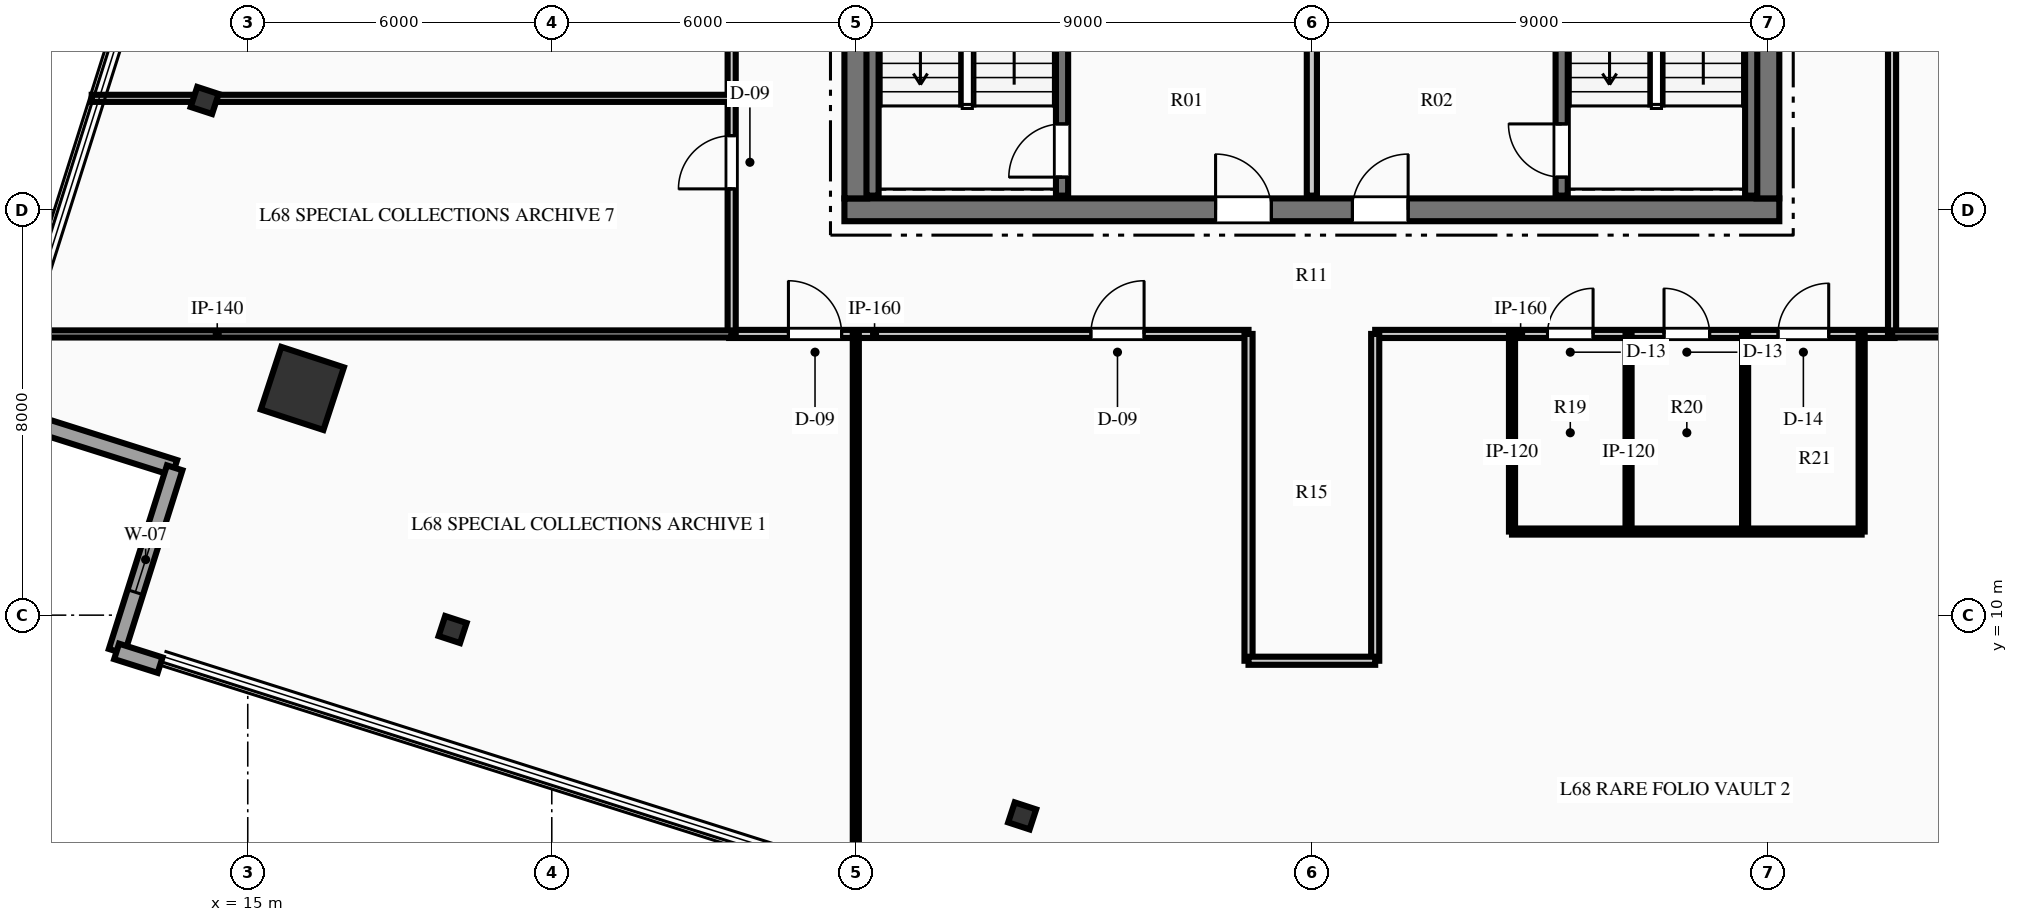
"""IFC4 building model, lengths in metres.
Left out: names, types, materials, properties, quantities, classifications, styles, units other than length and angle.
Written with IfcOpenShell. Run it as: python <this file> out.ifc"""

import sys

from ifc_helpers import new_model, si_unit, direction, frame, frame_2d, origin, origin_2d, place, context, subcontext, project, spatial, rectangle, hollow_rectangle, i_section, extrude, element, fill, save


model = new_model("IFC4")
c1 = context("Model", 3, precision=1e-05, world=origin(), true_north=direction((0.0, 1.0)))
c2 = subcontext(c1, "Body", "Model", "MODEL_VIEW")
j1 = project(units=[si_unit("LENGTHUNIT", "METRE"), si_unit("PLANEANGLEUNIT", "RADIAN")], contexts=[c1])
p1 = place(None, origin())
s1 = spatial("IfcSite", under=j1, at=p1, CompositionType="ELEMENT")
p2 = place(p1, origin())
s2 = spatial("IfcBuilding", under=s1, at=p2, CompositionType="ELEMENT")
p3 = place(p2, frame((0.0, 0.0, 271.2)))
s3 = spatial("IfcBuildingStorey", under=s2, at=p3, CompositionType="ELEMENT", Elevation=271.2)
p4 = place(p3, frame((26.775, 18.0, 0.0), z_axis=(0.0, 0.0, 1.0), x_axis=(1.0, 0.0, 0.0)))
e1 = element("IfcWall", 1, at=p4, inside=s3, PredefinedType="SHEAR", context=c2, shape_type="SweptSolid", body=[
    extrude(rectangle(XDim=18.45, YDim=0.45, at=frame_2d((9.225, 0.0))), origin(), (0.0, 0.0, 1.0), 3.75),
])
p5 = place(p4, frame((7.325, 0.0, 0.0)))
e2 = element("IfcOpeningElement", 2, at=p5, cuts=e1, PredefinedType="OPENING", context=c2, shape_type="SweptSolid", body=[
    extrude(rectangle(XDim=1.1, YDim=2.15, at=frame_2d((0.55, 1.075))), frame((0.0, 0.235, 0.0), z_axis=(0.0, -1.0, 0.0), x_axis=(1.0, 0.0, 0.0)), (0.0, 0.0, 1.0), 0.47),
])
p6 = place(p4, frame((10.025, 0.0, 0.0)))
e3 = element("IfcOpeningElement", 3, at=p6, cuts=e1, PredefinedType="OPENING", context=c2, shape_type="SweptSolid", body=[
    extrude(rectangle(XDim=1.1, YDim=2.15, at=frame_2d((0.55, 1.075))), frame((0.0, 0.235, 0.0), z_axis=(0.0, -1.0, 0.0), x_axis=(1.0, 0.0, 0.0)), (0.0, 0.0, 1.0), 0.47),
])
p7 = place(p3, frame((27.0, 18.225, 0.0), z_axis=(0.0, 0.0, 1.0), x_axis=(0.0, 1.0, 0.0)))
e4 = element("IfcWall", 4, at=p7, inside=s3, PredefinedType="SHEAR", context=c2, shape_type="SweptSolid", body=[
    extrude(rectangle(XDim=15.55, YDim=0.45, at=frame_2d((7.775, 0.0))), origin(), (0.0, 0.0, 1.0), 3.75),
])
p8 = place(p7, frame((10.015, 0.0, 0.0)))
e5 = element("IfcOpeningElement", 5, at=p8, cuts=e4, PredefinedType="OPENING", context=c2, shape_type="SweptSolid", body=[
    extrude(rectangle(XDim=1.4, YDim=2.2, at=frame_2d((0.7, 1.1))), frame((0.0, 0.235, 0.0), z_axis=(0.0, -1.0, 0.0), x_axis=(1.0, 0.0, 0.0)), (0.0, 0.0, 1.0), 0.47),
])
p9 = place(p3, frame((45.0, 18.225, 0.0), z_axis=(0.0, 0.0, 1.0), x_axis=(0.0, 1.0, 0.0)))
e6 = element("IfcWall", 6, at=p9, inside=s3, PredefinedType="SHEAR", context=c2, shape_type="SweptSolid", body=[
    extrude(rectangle(XDim=15.55, YDim=0.45, at=frame_2d((7.775, 0.0))), origin(), (0.0, 0.0, 1.0), 3.75),
])
p10 = place(p9, frame((10.015, 0.0, 0.0)))
e7 = element("IfcOpeningElement", 7, at=p10, cuts=e6, PredefinedType="OPENING", context=c2, shape_type="SweptSolid", body=[
    extrude(rectangle(XDim=1.4, YDim=2.2, at=frame_2d((0.7, 1.1))), frame((0.0, 0.235, 0.0), z_axis=(0.0, -1.0, 0.0), x_axis=(1.0, 0.0, 0.0)), (0.0, 0.0, 1.0), 0.47),
])
p11 = place(p3, frame((31.07, 18.28, 0.0), z_axis=(0.0, 0.0, 1.0), x_axis=(0.0, 1.0, 0.0)))
e8 = element("IfcWall", 8, at=p11, inside=s3, PredefinedType="SHEAR", context=c2, shape_type="SweptSolid", body=[
    extrude(rectangle(XDim=8.26, YDim=0.24, at=frame_2d((4.13, 0.0))), origin(), (0.0, 0.0, 1.0), 3.75),
])
p12 = place(p11, frame((0.365, 0.0, 0.0)))
e9 = element("IfcOpeningElement", 9, at=p12, cuts=e8, PredefinedType="OPENING", context=c2, shape_type="SweptSolid", body=[
    extrude(rectangle(XDim=1.05, YDim=2.15, at=frame_2d((0.525, 1.075))), frame((0.0, 0.13, 0.0), z_axis=(0.0, -1.0, 0.0), x_axis=(1.0, 0.0, 0.0)), (0.0, 0.0, 1.0), 0.26),
])
p13 = place(p3, frame((27.33, 18.28, 0.0), z_axis=(0.0, 0.0, 1.0), x_axis=(0.0, 1.0, 0.0)))
e10 = element("IfcWall", 10, at=p13, inside=s3, PredefinedType="SHEAR", context=c2, shape_type="SweptSolid", body=[
    extrude(rectangle(XDim=8.26, YDim=0.24, at=frame_2d((4.13, 0.0))), origin(), (0.0, 0.0, 1.0), 3.75),
])
p14 = place(p3, frame((40.93, 18.28, 0.0), z_axis=(0.0, 0.0, 1.0), x_axis=(0.0, 1.0, 0.0)))
e11 = element("IfcWall", 11, at=p14, inside=s3, PredefinedType="SHEAR", context=c2, shape_type="SweptSolid", body=[
    extrude(rectangle(XDim=8.26, YDim=0.24, at=frame_2d((4.13, 0.0))), origin(), (0.0, 0.0, 1.0), 3.75),
])
p15 = place(p14, frame((0.365, 0.0, 0.0)))
e12 = element("IfcOpeningElement", 12, at=p15, cuts=e11, PredefinedType="OPENING", context=c2, shape_type="SweptSolid", body=[
    extrude(rectangle(XDim=1.05, YDim=2.15, at=frame_2d((0.525, 1.075))), frame((0.0, 0.13, 0.0), z_axis=(0.0, -1.0, 0.0), x_axis=(1.0, 0.0, 0.0)), (0.0, 0.0, 1.0), 0.26),
])
p16 = place(p3, frame((44.67, 18.28, 0.0), z_axis=(0.0, 0.0, 1.0), x_axis=(0.0, 1.0, 0.0)))
e13 = element("IfcWall", 13, at=p16, inside=s3, PredefinedType="SHEAR", context=c2, shape_type="SweptSolid", body=[
    extrude(rectangle(XDim=8.26, YDim=0.24, at=frame_2d((4.13, 0.0))), origin(), (0.0, 0.0, 1.0), 3.75),
])
p17 = place(p3, frame((16.077, 14.475, 0.0), z_axis=(0.0, 0.0, 1.0), x_axis=(0.311008203279, 0.950407227189, 0.0)))
e14 = element("IfcColumn", 14, at=p17, inside=s3, PredefinedType="COLUMN", context=c2, shape_type="SweptSolid", body=[
    extrude(hollow_rectangle(XDim=1.3, YDim=1.3, WallThickness=0.06, at=origin_2d()), origin(), (0.0, 0.0, 1.0), 3.75),
])
for number, where, z_axis, x_axis in (
    (15, (14.149, 20.158, 0.0), (0.0, 0.0, 1.0), (0.311, 0.95, 0.0)),
    (16, (19.043, 9.716, 0.0), (0.0, 0.0, 1.0), (0.311, 0.95, 0.0)),
    (17, (30.283, 6.038, 0.0), (0.0, 0.0, 1.0), (0.311, 0.95, 0.0)),
):
    element("IfcColumn", number, at=place(p3, frame(where, z_axis=z_axis, x_axis=x_axis)), inside=s3, PredefinedType="COLUMN", context=c2, shape_type="SweptSolid", body=[
        extrude(i_section(OverallWidth=0.416, OverallDepth=0.445, WebThickness=0.039, FlangeThickness=0.063, at=origin_2d()), origin(), (0.0, 0.0, 1.0), 3.75),
    ])
p18 = place(p3, frame((13.558, 12.908, 0.0), z_axis=(0.0, 0.0, 1.0), x_axis=(-0.953440793023, 0.301580261621, 0.0)))
e18 = element("IfcWall", 18, at=p18, inside=s3, PredefinedType="STANDARD", context=c2, shape_type="SweptSolid", body=[
    extrude(rectangle(XDim=3.8, YDim=0.32, at=frame_2d((1.9, 0.0))), origin(), (0.0, 0.0, 1.0), 3.48),
])
p19 = place(p3, frame((12.412, 9.285, 0.0), z_axis=(0.0, 0.0, 1.0), x_axis=(0.301521855292, 0.953459265402, 0.0)))
e19 = element("IfcWall", 19, at=p19, inside=s3, PredefinedType="STANDARD", context=c2, shape_type="SweptSolid", body=[
    extrude(rectangle(XDim=3.8, YDim=0.32, at=frame_2d((1.9, 0.0))), origin(), (0.0, 0.0, 1.0), 3.48),
])
p20 = place(p19, frame((1.225, 0.0, 0.85)))
e20 = element("IfcOpeningElement", 20, at=p20, cuts=e19, PredefinedType="OPENING", context=c2, shape_type="SweptSolid", body=[
    extrude(rectangle(XDim=1.35, YDim=1.95, at=frame_2d((0.675, 0.975))), frame((0.0, 0.17, 0.0), z_axis=(0.0, -1.0, 0.0), x_axis=(1.0, 0.0, 0.0)), (0.0, 0.0, 1.0), 0.34),
])
p21 = place(p3, frame((13.27, 9.013, 0.0), z_axis=(0.0, 0.0, 1.0), x_axis=(-0.95342675946, 0.301624624899, 0.0)))
e21 = element("IfcWall", 21, at=p21, inside=s3, PredefinedType="STANDARD", context=c2, shape_type="SweptSolid", body=[
    extrude(rectangle(XDim=0.9, YDim=0.32, at=frame_2d((0.45, 0.0))), origin(), (0.0, 0.0, 1.0), 3.48),
])
p22 = place(p3, frame((36.0, 18.28, 0.0), z_axis=(0.0, 0.0, 1.0), x_axis=(0.0, 1.0, 0.0)))
e22 = element("IfcWall", 22, at=p22, inside=s3, PredefinedType="PARTITIONING", context=c2, shape_type="SweptSolid", body=[
    extrude(rectangle(XDim=3.77, YDim=0.2, at=frame_2d((1.885, 0.0))), origin(), (0.0, 0.0, 1.0), 3.48),
])
p23 = place(p3, frame((24.5, 15.55, 0.0), z_axis=(0.0, 0.0, 1.0), x_axis=(1.0, 0.0, 0.0)))
e23 = element("IfcWall", 23, at=p23, inside=s3, PredefinedType="PARTITIONING", context=c2, shape_type="SweptSolid", body=[
    extrude(rectangle(XDim=10.25, YDim=0.16, at=frame_2d((5.125, 0.0))), origin(), (0.0, 0.0, 1.0), 3.48),
])
p24 = place(p23, frame((1.17, 0.0, 0.0)))
e24 = element("IfcOpeningElement", 24, at=p24, cuts=e23, PredefinedType="OPENING", context=c2, shape_type="SweptSolid", body=[
    extrude(rectangle(XDim=1.05, YDim=2.15, at=frame_2d((0.525, 1.075))), frame((0.0, 0.09, 0.0), z_axis=(0.0, -1.0, 0.0), x_axis=(1.0, 0.0, 0.0)), (0.0, 0.0, 1.0), 0.18),
])
p25 = place(p23, frame((7.139, 0.0, 0.0)))
e25 = element("IfcOpeningElement", 25, at=p25, cuts=e23, PredefinedType="OPENING", context=c2, shape_type="SweptSolid", body=[
    extrude(rectangle(XDim=1.05, YDim=2.15, at=frame_2d((0.525, 1.075))), frame((0.0, 0.09, 0.0), z_axis=(0.0, -1.0, 0.0), x_axis=(1.0, 0.0, 0.0)), (0.0, 0.0, 1.0), 0.18),
])
p26 = place(p3, frame((37.25, 15.55, 0.0), z_axis=(0.0, 0.0, 1.0), x_axis=(1.0, 0.0, 0.0)))
e26 = element("IfcWall", 26, at=p26, inside=s3, PredefinedType="PARTITIONING", context=c2, shape_type="SweptSolid", body=[
    extrude(rectangle(XDim=10.25, YDim=0.16, at=frame_2d((5.125, 0.0))), origin(), (0.0, 0.0, 1.0), 3.48),
])
p27 = place(p26, frame((3.4, 0.0, 0.0)))
e27 = element("IfcOpeningElement", 27, at=p27, cuts=e26, PredefinedType="OPENING", context=c2, shape_type="SweptSolid", body=[
    extrude(rectangle(XDim=0.9, YDim=2.15, at=frame_2d((0.45, 1.075))), frame((0.0, 0.09, 0.0), z_axis=(0.0, -1.0, 0.0), x_axis=(1.0, 0.0, 0.0)), (0.0, 0.0, 1.0), 0.18),
])
p28 = place(p26, frame((5.7, 0.0, 0.0)))
e28 = element("IfcOpeningElement", 28, at=p28, cuts=e26, PredefinedType="OPENING", context=c2, shape_type="SweptSolid", body=[
    extrude(rectangle(XDim=0.9, YDim=2.15, at=frame_2d((0.45, 1.075))), frame((0.0, 0.09, 0.0), z_axis=(0.0, -1.0, 0.0), x_axis=(1.0, 0.0, 0.0)), (0.0, 0.0, 1.0), 0.18),
])
p29 = place(p26, frame((7.95, 0.0, 0.0)))
e29 = element("IfcOpeningElement", 29, at=p29, cuts=e26, PredefinedType="OPENING", context=c2, shape_type="SweptSolid", body=[
    extrude(rectangle(XDim=1.0, YDim=2.15, at=frame_2d((0.5, 1.075))), frame((0.0, 0.09, 0.0), z_axis=(0.0, -1.0, 0.0), x_axis=(1.0, 0.0, 0.0)), (0.0, 0.0, 1.0), 0.18),
])
p30 = place(p3, frame((24.55, 15.55, 0.0), z_axis=(0.0, 0.0, 1.0), x_axis=(0.0, 1.0, 0.0)))
e30 = element("IfcWall", 30, at=p30, inside=s3, PredefinedType="PARTITIONING", context=c2, shape_type="SweptSolid", body=[
    extrude(rectangle(XDim=9.2, YDim=0.16, at=frame_2d((4.6, 0.0))), origin(), (0.0, 0.0, 1.0), 3.48),
])
p31 = place(p30, frame((2.863, 0.0, 0.0)))
e31 = element("IfcOpeningElement", 31, at=p31, cuts=e30, PredefinedType="OPENING", context=c2, shape_type="SweptSolid", body=[
    extrude(rectangle(XDim=1.05, YDim=2.15, at=frame_2d((0.525, 1.075))), frame((0.0, 0.09, 0.0), z_axis=(0.0, -1.0, 0.0), x_axis=(1.0, 0.0, 0.0)), (0.0, 0.0, 1.0), 0.18),
])
p32 = place(p30, frame((6.12, 0.0, 0.0)))
e32 = element("IfcOpeningElement", 32, at=p32, cuts=e30, PredefinedType="OPENING", context=c2, shape_type="SweptSolid", body=[
    extrude(rectangle(XDim=1.05, YDim=2.15, at=frame_2d((0.525, 1.075))), frame((0.0, 0.09, 0.0), z_axis=(0.0, -1.0, 0.0), x_axis=(1.0, 0.0, 0.0)), (0.0, 0.0, 1.0), 0.18),
])
p33 = place(p3, frame((47.45, 15.55, 0.0), z_axis=(0.0, 0.0, 1.0), x_axis=(0.0, 1.0, 0.0)))
e33 = element("IfcWall", 33, at=p33, inside=s3, PredefinedType="PARTITIONING", context=c2, shape_type="SweptSolid", body=[
    extrude(rectangle(XDim=9.2, YDim=0.16, at=frame_2d((4.6, 0.0))), origin(), (0.0, 0.0, 1.0), 3.48),
])
p34 = place(p33, frame((5.731, 0.0, 0.0)))
e34 = element("IfcOpeningElement", 34, at=p34, cuts=e33, PredefinedType="OPENING", context=c2, shape_type="SweptSolid", body=[
    extrude(rectangle(XDim=1.05, YDim=2.15, at=frame_2d((0.525, 1.075))), frame((0.0, 0.09, 0.0), z_axis=(0.0, -1.0, 0.0), x_axis=(1.0, 0.0, 0.0)), (0.0, 0.0, 1.0), 0.18),
])
for number, where, z_axis, x_axis in (
    (35, (34.75, 9.1, 0.0), (0.0, 0.0, 1.0), (0.0, 1.0, 0.0)),
    (36, (37.25, 9.1, 0.0), (0.0, 0.0, 1.0), (0.0, 1.0, 0.0)),
):
    element("IfcWall", number, at=place(p3, frame(where, z_axis=z_axis, x_axis=x_axis)), inside=s3, PredefinedType="PARTITIONING", context=c2, shape_type="SweptSolid", body=[
        extrude(rectangle(XDim=6.45, YDim=0.16, at=frame_2d((3.225, 0.0))), origin(), (0.0, 0.0, 1.0), 3.48),
    ])
p35 = place(p3, frame((34.75, 9.1, 0.0), z_axis=(0.0, 0.0, 1.0), x_axis=(1.0, 0.0, 0.0)))
e37 = element("IfcWall", 37, at=p35, inside=s3, PredefinedType="PARTITIONING", context=c2, shape_type="SweptSolid", body=[
    extrude(rectangle(XDim=2.5, YDim=0.16, at=frame_2d((1.25, 0.0))), origin(), (0.0, 0.0, 1.0), 3.48),
])
for number, where, z_axis, x_axis in (
    (38, (39.95, 11.65, 0.0), (0.0, 0.0, 1.0), (0.0, 1.0, 0.0)),
    (39, (42.25, 11.65, 0.0), (0.0, 0.0, 1.0), (0.0, 1.0, 0.0)),
    (40, (44.55, 11.65, 0.0), (0.0, 0.0, 1.0), (0.0, 1.0, 0.0)),
    (41, (46.85, 11.65, 0.0), (0.0, 0.0, 1.0), (0.0, 1.0, 0.0)),
):
    element("IfcWall", number, at=place(p3, frame(where, z_axis=z_axis, x_axis=x_axis)), inside=s3, PredefinedType="PARTITIONING", context=c2, shape_type="SweptSolid", body=[
        extrude(rectangle(XDim=3.9, YDim=0.12, at=frame_2d((1.95, 0.0))), origin(), (0.0, 0.0, 1.0), 3.48),
    ])
p36 = place(p3, frame((39.95, 11.65, 0.0), z_axis=(0.0, 0.0, 1.0), x_axis=(1.0, 0.0, 0.0)))
e42 = element("IfcWall", 42, at=p36, inside=s3, PredefinedType="PARTITIONING", context=c2, shape_type="SweptSolid", body=[
    extrude(rectangle(XDim=6.9, YDim=0.12, at=frame_2d((3.45, 0.0))), origin(), (0.0, 0.0, 1.0), 3.48),
])
p37 = place(p3, frame((10.45, 15.55, 0.0), z_axis=(0.0, 0.0, 1.0), x_axis=(1.0, 0.0, 0.0)))
e43 = element("IfcWall", 43, at=p37, inside=s3, PredefinedType="PARTITIONING", context=c2, shape_type="SweptSolid", body=[
    extrude(rectangle(XDim=14.1, YDim=0.14, at=frame_2d((7.05, 0.0))), origin(), (0.0, 0.0, 1.0), 2.858),
])
p38 = place(p3, frame((47.45, 15.55, 0.0), z_axis=(0.0, 0.0, 1.0), x_axis=(1.0, 0.0, 0.0)))
e44 = element("IfcWall", 44, at=p38, inside=s3, PredefinedType="PARTITIONING", context=c2, shape_type="SweptSolid", body=[
    extrude(rectangle(XDim=9.142, YDim=0.14, at=frame_2d((4.571, 0.0))), origin(), (0.0, 0.0, 1.0), 3.48),
])
p39 = place(p3, frame((27.0, 4.713, 0.0), z_axis=(0.0, 0.0, 1.0), x_axis=(0.0, 1.0, 0.0)))
e45 = element("IfcWall", 45, at=p39, inside=s3, PredefinedType="PARTITIONING", context=c2, shape_type="SweptSolid", body=[
    extrude(rectangle(XDim=10.837, YDim=0.12, at=frame_2d((5.418, 0.0))), origin(), (0.0, 0.0, 1.0), 3.48),
])
p40 = place(p3, frame((11.92, 20.2, 0.0), z_axis=(0.0, 0.0, 1.0), x_axis=(1.0, 0.0, 0.0)))
e46 = element("IfcWall", 46, at=p40, inside=s3, PredefinedType="PARTITIONING", context=c2, shape_type="SweptSolid", body=[
    extrude(rectangle(XDim=12.63, YDim=0.14, at=frame_2d((6.315, 0.0))), origin(), (0.0, 0.0, 1.0), 2.858),
])
p41 = place(p20, origin())
e47 = element("IfcWindow", 47, at=p41, inside=s3, PartitioningType="SINGLE_PANEL", PredefinedType="WINDOW", context=c2, shape_type="SweptSolid", body=[
    extrude(rectangle(XDim=1.35, YDim=1.95, at=frame_2d((0.675, 0.975))), frame((0.0, 0.03, 0.0), z_axis=(0.0, -1.0, 0.0), x_axis=(1.0, 0.0, 0.0)), (0.0, 0.0, 1.0), 0.06),
])
fill(e20, e47)
p42 = place(p12, origin())
e48 = element("IfcDoor", 48, at=p42, inside=s3, OperationType="SINGLE_SWING_LEFT", PredefinedType="DOOR", context=c2, shape_type="SweptSolid", body=[
    extrude(rectangle(XDim=1.05, YDim=2.15, at=frame_2d((0.525, 1.075))), frame((0.0, 0.025, 0.0), z_axis=(0.0, -1.0, 0.0), x_axis=(1.0, 0.0, 0.0)), (0.0, 0.0, 1.0), 0.05),
])
fill(e9, e48)
p43 = place(p15, origin())
e49 = element("IfcDoor", 49, at=p43, inside=s3, OperationType="SINGLE_SWING_RIGHT", PredefinedType="DOOR", context=c2, shape_type="SweptSolid", body=[
    extrude(rectangle(XDim=1.05, YDim=2.15, at=frame_2d((0.525, 1.075))), frame((0.0, 0.025, 0.0), z_axis=(0.0, -1.0, 0.0), x_axis=(1.0, 0.0, 0.0)), (0.0, 0.0, 1.0), 0.05),
])
fill(e12, e49)
p44 = place(p5, origin())
e50 = element("IfcDoor", 50, at=p44, inside=s3, OperationType="SINGLE_SWING_LEFT", PredefinedType="DOOR", context=c2, shape_type="SweptSolid", body=[
    extrude(rectangle(XDim=1.1, YDim=2.15, at=frame_2d((0.55, 1.075))), frame((0.0, 0.025, 0.0), z_axis=(0.0, -1.0, 0.0), x_axis=(1.0, 0.0, 0.0)), (0.0, 0.0, 1.0), 0.05),
])
fill(e2, e50)
p45 = place(p6, origin())
e51 = element("IfcDoor", 51, at=p45, inside=s3, OperationType="SINGLE_SWING_RIGHT", PredefinedType="DOOR", context=c2, shape_type="SweptSolid", body=[
    extrude(rectangle(XDim=1.1, YDim=2.15, at=frame_2d((0.55, 1.075))), frame((0.0, 0.025, 0.0), z_axis=(0.0, -1.0, 0.0), x_axis=(1.0, 0.0, 0.0)), (0.0, 0.0, 1.0), 0.05),
])
fill(e3, e51)
p46 = place(p27, origin())
e52 = element("IfcDoor", 52, at=p46, inside=s3, OperationType="SINGLE_SWING_RIGHT", PredefinedType="DOOR", context=c2, shape_type="SweptSolid", body=[
    extrude(rectangle(XDim=0.9, YDim=2.15, at=frame_2d((0.45, 1.075))), frame((0.0, 0.025, 0.0), z_axis=(0.0, -1.0, 0.0), x_axis=(1.0, 0.0, 0.0)), (0.0, 0.0, 1.0), 0.05),
])
fill(e27, e52)
p47 = place(p28, origin())
e53 = element("IfcDoor", 53, at=p47, inside=s3, OperationType="SINGLE_SWING_LEFT", PredefinedType="DOOR", context=c2, shape_type="SweptSolid", body=[
    extrude(rectangle(XDim=0.9, YDim=2.15, at=frame_2d((0.45, 1.075))), frame((0.0, 0.025, 0.0), z_axis=(0.0, -1.0, 0.0), x_axis=(1.0, 0.0, 0.0)), (0.0, 0.0, 1.0), 0.05),
])
fill(e28, e53)
p48 = place(p29, origin())
e54 = element("IfcDoor", 54, at=p48, inside=s3, OperationType="SINGLE_SWING_RIGHT", PredefinedType="DOOR", context=c2, shape_type="SweptSolid", body=[
    extrude(rectangle(XDim=1.0, YDim=2.15, at=frame_2d((0.5, 1.075))), frame((0.0, 0.025, 0.0), z_axis=(0.0, -1.0, 0.0), x_axis=(1.0, 0.0, 0.0)), (0.0, 0.0, 1.0), 0.05),
])
fill(e29, e54)
p49 = place(p24, origin())
e55 = element("IfcDoor", 55, at=p49, inside=s3, OperationType="SINGLE_SWING_LEFT", PredefinedType="DOOR", context=c2, shape_type="SweptSolid", body=[
    extrude(rectangle(XDim=1.05, YDim=2.15, at=frame_2d((0.525, 1.075))), frame((0.0, 0.025, 0.0), z_axis=(0.0, -1.0, 0.0), x_axis=(1.0, 0.0, 0.0)), (0.0, 0.0, 1.0), 0.05),
])
fill(e24, e55)
p50 = place(p25, origin())
e56 = element("IfcDoor", 56, at=p50, inside=s3, OperationType="SINGLE_SWING_RIGHT", PredefinedType="DOOR", context=c2, shape_type="SweptSolid", body=[
    extrude(rectangle(XDim=1.05, YDim=2.15, at=frame_2d((0.525, 1.075))), frame((0.0, 0.025, 0.0), z_axis=(0.0, -1.0, 0.0), x_axis=(1.0, 0.0, 0.0)), (0.0, 0.0, 1.0), 0.05),
])
fill(e25, e56)
p51 = place(p31, origin())
e57 = element("IfcDoor", 57, at=p51, inside=s3, OperationType="SINGLE_SWING_LEFT", PredefinedType="DOOR", context=c2, shape_type="SweptSolid", body=[
    extrude(rectangle(XDim=1.05, YDim=2.15, at=frame_2d((0.525, 1.075))), frame((0.0, 0.025, 0.0), z_axis=(0.0, -1.0, 0.0), x_axis=(1.0, 0.0, 0.0)), (0.0, 0.0, 1.0), 0.05),
])
fill(e31, e57)
save(model, sys.argv[1])
